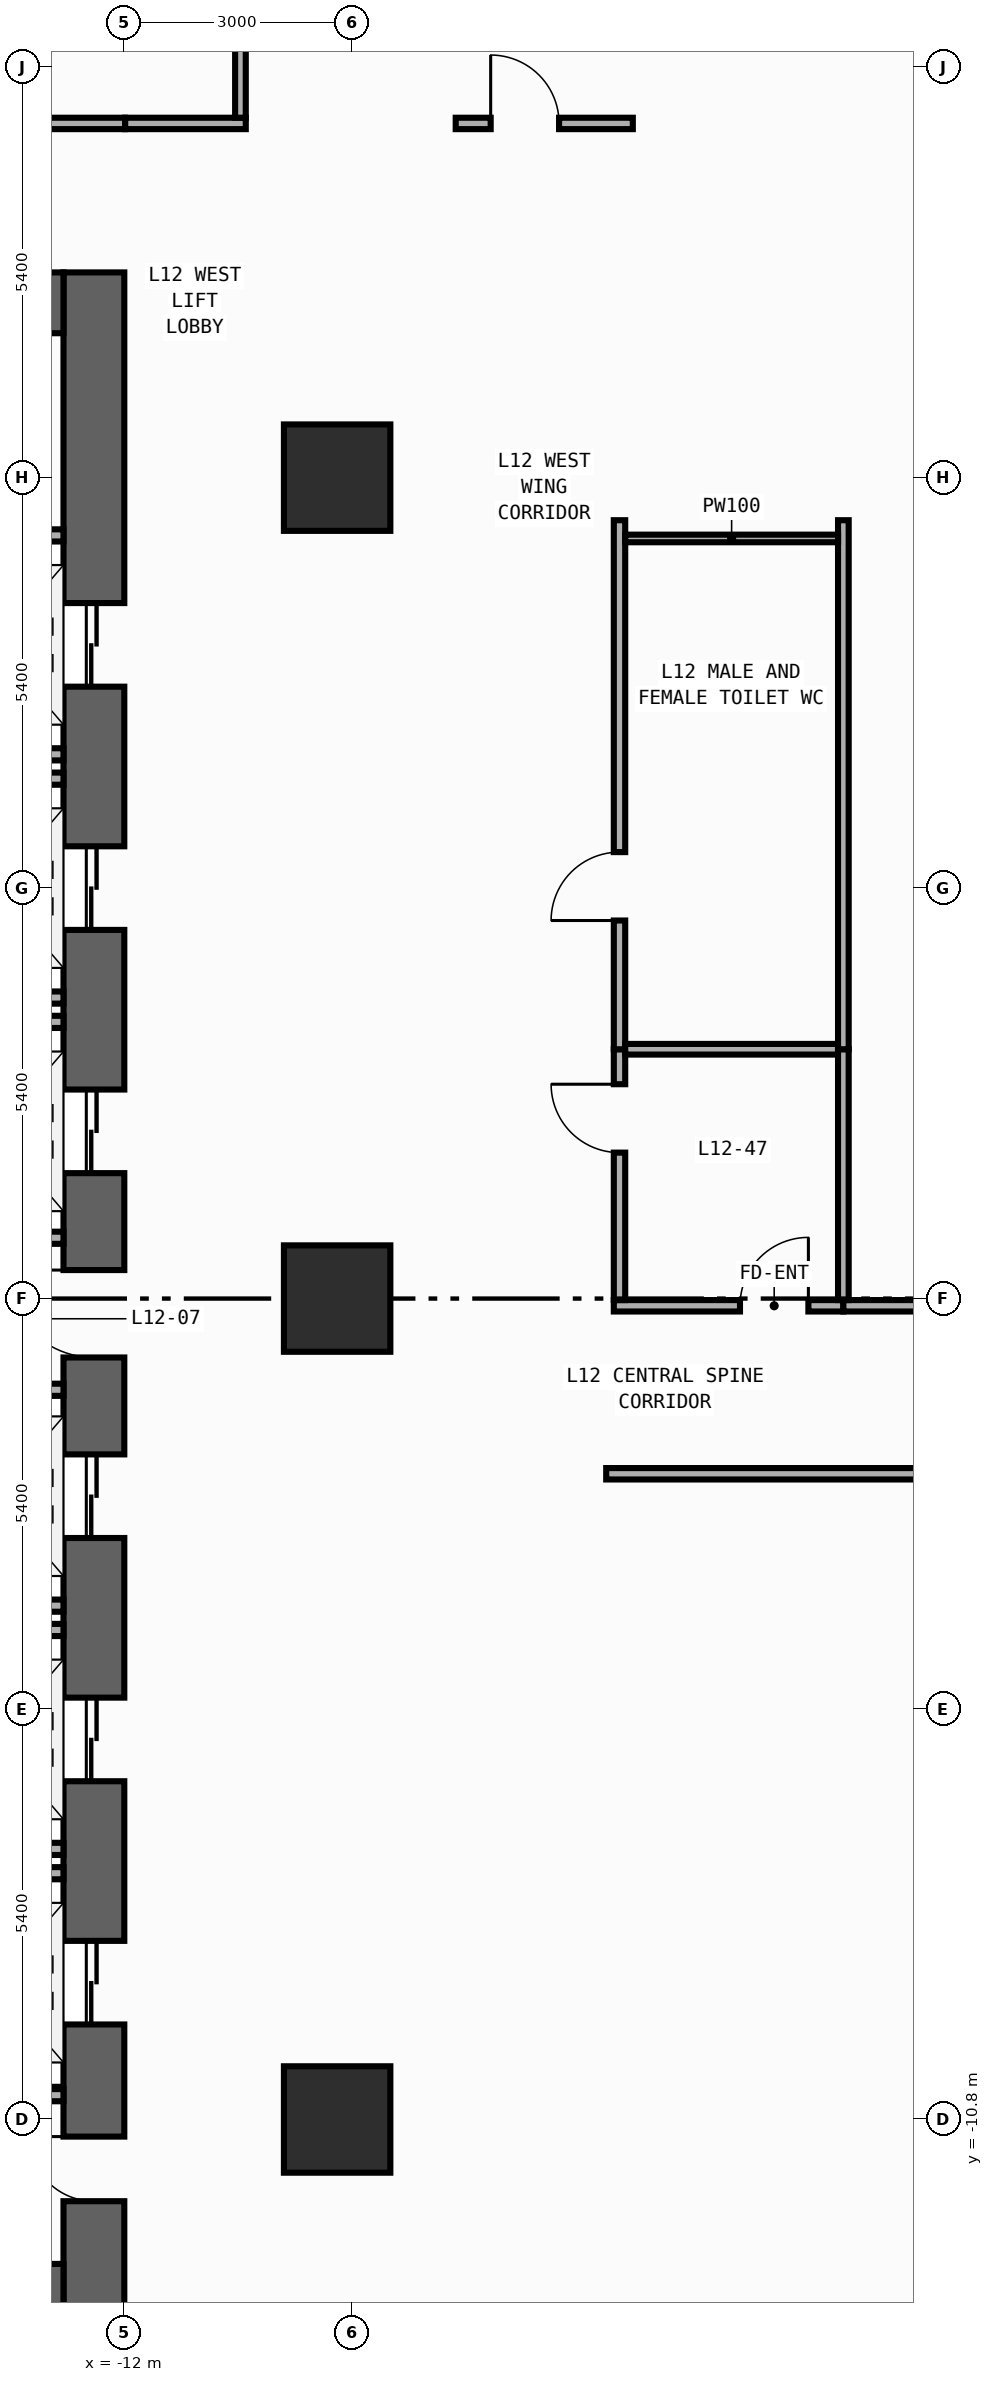
"""IFC4 building model, lengths in metres.
Left out: names, types, materials, properties, quantities, classifications, styles, units other than length and angle.
Written with IfcOpenShell. Run it as: python <this file> out.ifc"""

import sys

from ifc_helpers import new_model, si_unit, direction, frame, frame_2d, origin, origin_2d, place, context, subcontext, project, spatial, rectangle, extrude, element, fill, save


model = new_model("IFC4")
c1 = context("Model", 3, precision=1e-05, world=origin(), true_north=direction((0.0, 1.0)))
c2 = subcontext(c1, "Body", "Model", "MODEL_VIEW")
j1 = project(units=[si_unit("LENGTHUNIT", "METRE"), si_unit("PLANEANGLEUNIT", "RADIAN")], contexts=[c1])
p1 = place(None, origin())
s1 = spatial("IfcSite", under=j1, at=p1, CompositionType="ELEMENT")
p2 = place(p1, origin())
s2 = spatial("IfcBuilding", under=s1, at=p2, CompositionType="ELEMENT")
p3 = place(p2, frame((0.0, 0.0, 51.2)))
s3 = spatial("IfcBuildingStorey", under=s2, at=p3, CompositionType="ELEMENT", Elevation=51.2)
p4 = place(p3, frame((-12.4, -13.5, 0.0), z_axis=(0.0, 0.0, 1.0), x_axis=(0.0, 1.0, 0.0)))
e1 = element("IfcWall", 1, at=p4, inside=s3, PredefinedType="SHEAR", context=c2, shape_type="SweptSolid", body=[
    extrude(rectangle(XDim=27.0, YDim=0.8, at=frame_2d((13.5, 0.0))), origin(), (0.0, 0.0, 1.0), 3.94),
])
p5 = place(p4, frame((21.55, 0.0, 0.0)))
e2 = element("IfcOpeningElement", 2, at=p5, cuts=e1, PredefinedType="OPENING", context=c2, shape_type="SweptSolid", body=[
    extrude(rectangle(XDim=1.1, YDim=2.2, at=frame_2d((0.55, 1.1))), frame((0.0, 0.41, 0.0), z_axis=(0.0, -1.0, 0.0), x_axis=(1.0, 0.0, 0.0)), (0.0, 0.0, 1.0), 0.82),
])
p6 = place(p4, frame((18.35, 0.0, 0.0)))
e3 = element("IfcOpeningElement", 3, at=p6, cuts=e1, PredefinedType="OPENING", context=c2, shape_type="SweptSolid", body=[
    extrude(rectangle(XDim=1.1, YDim=2.2, at=frame_2d((0.55, 1.1))), frame((0.0, 0.41, 0.0), z_axis=(0.0, -1.0, 0.0), x_axis=(1.0, 0.0, 0.0)), (0.0, 0.0, 1.0), 0.82),
])
p7 = place(p4, frame((15.15, 0.0, 0.0)))
e4 = element("IfcOpeningElement", 4, at=p7, cuts=e1, PredefinedType="OPENING", context=c2, shape_type="SweptSolid", body=[
    extrude(rectangle(XDim=1.1, YDim=2.2, at=frame_2d((0.55, 1.1))), frame((0.0, 0.41, 0.0), z_axis=(0.0, -1.0, 0.0), x_axis=(1.0, 0.0, 0.0)), (0.0, 0.0, 1.0), 0.82),
])
p8 = place(p4, frame((10.35, 0.0, 0.0)))
e5 = element("IfcOpeningElement", 5, at=p8, cuts=e1, PredefinedType="OPENING", context=c2, shape_type="SweptSolid", body=[
    extrude(rectangle(XDim=1.1, YDim=2.2, at=frame_2d((0.55, 1.1))), frame((0.0, 0.41, 0.0), z_axis=(0.0, -1.0, 0.0), x_axis=(1.0, 0.0, 0.0)), (0.0, 0.0, 1.0), 0.82),
])
p9 = place(p4, frame((7.15, 0.0, 0.0)))
e6 = element("IfcOpeningElement", 6, at=p9, cuts=e1, PredefinedType="OPENING", context=c2, shape_type="SweptSolid", body=[
    extrude(rectangle(XDim=1.1, YDim=2.2, at=frame_2d((0.55, 1.1))), frame((0.0, 0.41, 0.0), z_axis=(0.0, -1.0, 0.0), x_axis=(1.0, 0.0, 0.0)), (0.0, 0.0, 1.0), 0.82),
])
p10 = place(p4, frame((3.95, 0.0, 0.0)))
e7 = element("IfcOpeningElement", 7, at=p10, cuts=e1, PredefinedType="OPENING", context=c2, shape_type="SweptSolid", body=[
    extrude(rectangle(XDim=1.1, YDim=2.2, at=frame_2d((0.55, 1.1))), frame((0.0, 0.41, 0.0), z_axis=(0.0, -1.0, 0.0), x_axis=(1.0, 0.0, 0.0)), (0.0, 0.0, 1.0), 0.82),
])
p11 = place(p4, frame((12.725, 0.0, 0.0)))
e8 = element("IfcOpeningElement", 8, at=p11, cuts=e1, PredefinedType="OPENING", context=c2, shape_type="SweptSolid", body=[
    extrude(rectangle(XDim=1.15, YDim=2.2, at=frame_2d((0.575, 1.1))), frame((0.0, 0.41, 0.0), z_axis=(0.0, -1.0, 0.0), x_axis=(1.0, 0.0, 0.0)), (0.0, 0.0, 1.0), 0.82),
])
p12 = place(p4, frame((1.625, 0.0, 0.0)))
e9 = element("IfcOpeningElement", 9, at=p12, cuts=e1, PredefinedType="OPENING", context=c2, shape_type="SweptSolid", body=[
    extrude(rectangle(XDim=0.85, YDim=2.1, at=frame_2d((0.425, 1.05))), frame((0.0, 0.41, 0.0), z_axis=(0.0, -1.0, 0.0), x_axis=(1.0, 0.0, 0.0)), (0.0, 0.0, 1.0), 0.82),
])
for number, where, z_axis, x_axis in (
    (10, (-19.6, -13.1, 0.0), (0.0, 0.0, 1.0), (1.0, 0.0, 0.0)),
    (11, (-19.6, 13.1, 0.0), (0.0, 0.0, 1.0), (1.0, 0.0, 0.0)),
):
    element("IfcWall", number, at=place(p3, frame(where, z_axis=z_axis, x_axis=x_axis)), inside=s3, PredefinedType="SHEAR", context=c2, shape_type="SweptSolid", body=[
        extrude(rectangle(XDim=6.8, YDim=0.8, at=frame_2d((3.4, 0.0))), origin(), (0.0, 0.0, 1.0), 3.94),
    ])
for number, where, z_axis, x_axis in (
    (12, (-9.2, -10.8, 0.0), (0.0, 0.0, 1.0), (1.0, 0.0, 0.0)),
    (13, (-9.2, 0.0, 0.0), (0.0, 0.0, 1.0), (1.0, 0.0, 0.0)),
    (14, (-9.2, 10.8, 0.0), (0.0, 0.0, 1.0), (1.0, 0.0, 0.0)),
):
    element("IfcColumn", number, at=place(p3, frame(where, z_axis=z_axis, x_axis=x_axis)), inside=s3, PredefinedType="COLUMN", context=c2, shape_type="SweptSolid", body=[
        extrude(rectangle(XDim=1.4, YDim=1.4, at=origin_2d()), origin(), (0.0, 0.0, 1.0), 4.2),
    ])
for number, where, z_axis, x_axis in (
    (15, (-14.99, 7.16, 0.0), (0.0, 0.0, 1.0), (1.0, 0.0, 0.0)),
    (16, (-14.99, 10.04, 0.0), (0.0, 0.0, 1.0), (1.0, 0.0, 0.0)),
    (17, (-14.99, 3.96, 0.0), (0.0, 0.0, 1.0), (1.0, 0.0, 0.0)),
    (18, (-14.99, 6.84, 0.0), (0.0, 0.0, 1.0), (1.0, 0.0, 0.0)),
    (19, (-14.99, 3.64, 0.0), (0.0, 0.0, 1.0), (1.0, 0.0, 0.0)),
    (20, (-14.99, -4.04, 0.0), (0.0, 0.0, 1.0), (1.0, 0.0, 0.0)),
    (21, (-14.99, -7.24, 0.0), (0.0, 0.0, 1.0), (1.0, 0.0, 0.0)),
    (22, (-14.99, -4.36, 0.0), (0.0, 0.0, 1.0), (1.0, 0.0, 0.0)),
    (23, (-14.99, -7.56, 0.0), (0.0, 0.0, 1.0), (1.0, 0.0, 0.0)),
):
    element("IfcWall", number, at=place(p3, frame(where, z_axis=z_axis, x_axis=x_axis)), inside=s3, PredefinedType="STANDARD", context=c2, shape_type="SweptSolid", body=[
        extrude(rectangle(XDim=2.19, YDim=0.16, at=frame_2d((1.095, 0.0))), origin(), (0.0, 0.0, 1.0), 3.94),
    ])
for number, where, z_axis, x_axis in (
    (24, (-15.4, 0.8, 0.0), (0.0, 0.0, 1.0), (1.0, 0.0, 0.0)),
    (25, (-15.4, -1.2, 0.0), (0.0, 0.0, 1.0), (1.0, 0.0, 0.0)),
    (26, (-15.4, -10.48, 0.0), (0.0, 0.0, 1.0), (1.0, 0.0, 0.0)),
):
    element("IfcWall", number, at=place(p3, frame(where, z_axis=z_axis, x_axis=x_axis)), inside=s3, PredefinedType="STANDARD", context=c2, shape_type="SweptSolid", body=[
        extrude(rectangle(XDim=2.6, YDim=0.16, at=frame_2d((1.3, 0.0))), origin(), (0.0, 0.0, 1.0), 3.94),
    ])
p13 = place(p3, frame((-11.99, 15.46, 0.0), z_axis=(0.0, 0.0, 1.0), x_axis=(1.0, 0.0, 0.0)))
e27 = element("IfcWall", 27, at=p13, inside=s3, PredefinedType="PARTITIONING", context=c2, shape_type="SweptSolid", body=[
    extrude(rectangle(XDim=1.588, YDim=0.15, at=frame_2d((0.794, 0.0))), origin(), (0.0, 0.0, 1.0), 3.94),
])
p14 = place(p3, frame((-5.56, -0.095, 0.0), z_axis=(0.0, 0.0, 1.0), x_axis=(1.0, 0.0, 0.0)))
e28 = element("IfcWall", 28, at=p14, inside=s3, PredefinedType="PARTITIONING", context=c2, shape_type="SweptSolid", body=[
    extrude(rectangle(XDim=3.02, YDim=0.15, at=frame_2d((1.51, 0.0))), origin(), (0.0, 0.0, 1.0), 3.14),
])
p15 = place(p14, frame((1.66, 0.0, 0.0)))
e29 = element("IfcOpeningElement", 29, at=p15, cuts=e28, PredefinedType="OPENING", context=c2, shape_type="SweptSolid", body=[
    extrude(rectangle(XDim=0.9, YDim=2.15, at=frame_2d((0.45, 1.075))), frame((0.0, 0.085, 0.0), z_axis=(0.0, -1.0, 0.0), x_axis=(1.0, 0.0, 0.0)), (0.0, 0.0, 1.0), 0.17),
])
p16 = place(p3, frame((-2.54, -0.095, 0.0), z_axis=(0.0, 0.0, 1.0), x_axis=(1.0, 0.0, 0.0)))
e30 = element("IfcWall", 30, at=p16, inside=s3, PredefinedType="PARTITIONING", context=c2, shape_type="SweptSolid", body=[
    extrude(rectangle(XDim=9.3, YDim=0.15, at=frame_2d((4.65, 0.0))), origin(), (0.0, 0.0, 1.0), 3.14),
])
p17 = place(p16, frame((2.077, 0.0, 0.0)))
e31 = element("IfcOpeningElement", 31, at=p17, cuts=e30, PredefinedType="OPENING", context=c2, shape_type="SweptSolid", body=[
    extrude(rectangle(XDim=0.9, YDim=2.15, at=frame_2d((0.45, 1.075))), frame((0.0, 0.085, 0.0), z_axis=(0.0, -1.0, 0.0), x_axis=(1.0, 0.0, 0.0)), (0.0, 0.0, 1.0), 0.17),
])
p18 = place(p3, frame((-5.66, -2.305, 0.0), z_axis=(0.0, 0.0, 1.0), x_axis=(1.0, 0.0, 0.0)))
e32 = element("IfcWall", 32, at=p18, inside=s3, PredefinedType="PARTITIONING", context=c2, shape_type="SweptSolid", body=[
    extrude(rectangle(XDim=12.52, YDim=0.15, at=frame_2d((6.26, 0.0))), origin(), (0.0, 0.0, 1.0), 3.94),
])
p19 = place(p18, frame((5.305, 0.0, 0.0)))
e33 = element("IfcOpeningElement", 33, at=p19, cuts=e32, PredefinedType="OPENING", context=c2, shape_type="SweptSolid", body=[
    extrude(rectangle(XDim=0.9, YDim=2.15, at=frame_2d((0.45, 1.075))), frame((0.0, 0.085, 0.0), z_axis=(0.0, -1.0, 0.0), x_axis=(1.0, 0.0, 0.0)), (0.0, 0.0, 1.0), 0.17),
])
p20 = place(p3, frame((-7.64, 15.46, 0.0), z_axis=(0.0, 0.0, 1.0), x_axis=(1.0, 0.0, 0.0)))
e34 = element("IfcWall", 34, at=p20, inside=s3, PredefinedType="PARTITIONING", context=c2, shape_type="SweptSolid", body=[
    extrude(rectangle(XDim=2.33, YDim=0.15, at=frame_2d((1.165, 0.0))), origin(), (0.0, 0.0, 1.0), 3.94),
])
p21 = place(p20, frame((0.46, 0.0, 0.0)))
e35 = element("IfcOpeningElement", 35, at=p21, cuts=e34, PredefinedType="OPENING", context=c2, shape_type="SweptSolid", body=[
    extrude(rectangle(XDim=0.9, YDim=2.15, at=frame_2d((0.45, 1.075))), frame((0.0, 0.085, 0.0), z_axis=(0.0, -1.0, 0.0), x_axis=(1.0, 0.0, 0.0)), (0.0, 0.0, 1.0), 0.17),
])
p22 = place(p3, frame((-5.485, -0.02, 0.0), z_axis=(0.0, 0.0, 1.0), x_axis=(0.0, 1.0, 0.0)))
e36 = element("IfcWall", 36, at=p22, inside=s3, PredefinedType="PARTITIONING", context=c2, shape_type="SweptSolid", body=[
    extrude(rectangle(XDim=3.3, YDim=0.15, at=frame_2d((1.65, 0.0))), origin(), (0.0, 0.0, 1.0), 3.94),
])
p23 = place(p22, frame((1.94, 0.0, 0.0)))
e37 = element("IfcOpeningElement", 37, at=p23, cuts=e36, PredefinedType="OPENING", context=c2, shape_type="SweptSolid", body=[
    extrude(rectangle(XDim=0.9, YDim=2.15, at=frame_2d((0.45, 1.075))), frame((0.0, 0.085, 0.0), z_axis=(0.0, -1.0, 0.0), x_axis=(1.0, 0.0, 0.0)), (0.0, 0.0, 1.0), 0.17),
])
p24 = place(p3, frame((-5.485, 3.28, 0.0), z_axis=(0.0, 0.0, 1.0), x_axis=(0.0, 1.0, 0.0)))
e38 = element("IfcWall", 38, at=p24, inside=s3, PredefinedType="PARTITIONING", context=c2, shape_type="SweptSolid", body=[
    extrude(rectangle(XDim=6.96, YDim=0.15, at=frame_2d((3.48, 0.0))), origin(), (0.0, 0.0, 1.0), 3.94),
])
p25 = place(p24, frame((1.694, 0.0, 0.0)))
e39 = element("IfcOpeningElement", 39, at=p25, cuts=e38, PredefinedType="OPENING", context=c2, shape_type="SweptSolid", body=[
    extrude(rectangle(XDim=0.9, YDim=2.15, at=frame_2d((0.45, 1.075))), frame((0.0, 0.085, 0.0), z_axis=(0.0, -1.0, 0.0), x_axis=(1.0, 0.0, 0.0)), (0.0, 0.0, 1.0), 0.17),
])
p26 = place(p3, frame((-20.64, 15.46, 0.0), z_axis=(0.0, 0.0, 1.0), x_axis=(1.0, 0.0, 0.0)))
e40 = element("IfcWall", 40, at=p26, inside=s3, PredefinedType="PARTITIONING", context=c2, shape_type="SweptSolid", body=[
    extrude(rectangle(XDim=8.65, YDim=0.15, at=frame_2d((4.325, 0.0))), origin(), (0.0, 0.0, 1.0), 3.94),
])
p27 = place(p26, frame((2.871, 0.0, 0.0)))
e41 = element("IfcOpeningElement", 41, at=p27, cuts=e40, PredefinedType="OPENING", context=c2, shape_type="SweptSolid", body=[
    extrude(rectangle(XDim=0.9, YDim=2.15, at=frame_2d((0.45, 1.075))), frame((0.0, 0.085, 0.0), z_axis=(0.0, -1.0, 0.0), x_axis=(1.0, 0.0, 0.0)), (0.0, 0.0, 1.0), 0.17),
])
p28 = place(p3, frame((-10.472, 15.535, 0.0), z_axis=(0.0, 0.0, 1.0), x_axis=(0.0, 1.0, 0.0)))
e42 = element("IfcWall", 42, at=p28, inside=s3, PredefinedType="PARTITIONING", context=c2, shape_type="SweptSolid", body=[
    extrude(rectangle(XDim=11.32, YDim=0.14, at=frame_2d((5.66, 0.0))), origin(), (0.0, 0.0, 1.0), 3.94),
])
p29 = place(p3, frame((-5.41, 3.28, 0.0), z_axis=(0.0, 0.0, 1.0), x_axis=(1.0, 0.0, 0.0)))
e43 = element("IfcWall", 43, at=p29, inside=s3, PredefinedType="PARTITIONING", context=c2, shape_type="SweptSolid", body=[
    extrude(rectangle(XDim=2.8, YDim=0.14, at=frame_2d((1.4, 0.0))), origin(), (0.0, 0.0, 1.0), 3.94),
])
p30 = place(p3, frame((-2.54, -0.02, 0.0), z_axis=(0.0, 0.0, 1.0), x_axis=(0.0, 1.0, 0.0)))
e44 = element("IfcWall", 44, at=p30, inside=s3, PredefinedType="PARTITIONING", context=c2, shape_type="SweptSolid", body=[
    extrude(rectangle(XDim=3.3, YDim=0.14, at=frame_2d((1.65, 0.0))), origin(), (0.0, 0.0, 1.0), 3.94),
])
p31 = place(p3, frame((-2.54, 3.28, 0.0), z_axis=(0.0, 0.0, 1.0), x_axis=(0.0, 1.0, 0.0)))
e45 = element("IfcWall", 45, at=p31, inside=s3, PredefinedType="PARTITIONING", context=c2, shape_type="SweptSolid", body=[
    extrude(rectangle(XDim=6.96, YDim=0.14, at=frame_2d((3.48, 0.0))), origin(), (0.0, 0.0, 1.0), 3.94),
])
p32 = place(p3, frame((-5.41, 10.0, 0.0), z_axis=(0.0, 0.0, 1.0), x_axis=(1.0, 0.0, 0.0)))
e46 = element("IfcWall", 46, at=p32, inside=s3, PredefinedType="PARTITIONING", context=c2, shape_type="SweptSolid", body=[
    extrude(rectangle(XDim=2.8, YDim=0.1, at=frame_2d((1.4, 0.0))), origin(), (0.0, 0.0, 1.0), 3.94),
])
p33 = place(p5, origin())
e47 = element("IfcDoor", 47, at=p33, inside=s3, OperationType="DOUBLE_DOOR_SLIDING", PredefinedType="DOOR", context=c2, shape_type="SweptSolid", body=[
    extrude(rectangle(XDim=1.1, YDim=2.2, at=frame_2d((0.55, 1.1))), frame((0.0, 0.025, 0.0), z_axis=(0.0, -1.0, 0.0), x_axis=(1.0, 0.0, 0.0)), (0.0, 0.0, 1.0), 0.05),
])
fill(e2, e47)
p34 = place(p6, origin())
e48 = element("IfcDoor", 48, at=p34, inside=s3, OperationType="DOUBLE_DOOR_SLIDING", PredefinedType="DOOR", context=c2, shape_type="SweptSolid", body=[
    extrude(rectangle(XDim=1.1, YDim=2.2, at=frame_2d((0.55, 1.1))), frame((0.0, 0.025, 0.0), z_axis=(0.0, -1.0, 0.0), x_axis=(1.0, 0.0, 0.0)), (0.0, 0.0, 1.0), 0.05),
])
fill(e3, e48)
p35 = place(p7, origin())
e49 = element("IfcDoor", 49, at=p35, inside=s3, OperationType="DOUBLE_DOOR_SLIDING", PredefinedType="DOOR", context=c2, shape_type="SweptSolid", body=[
    extrude(rectangle(XDim=1.1, YDim=2.2, at=frame_2d((0.55, 1.1))), frame((0.0, 0.025, 0.0), z_axis=(0.0, -1.0, 0.0), x_axis=(1.0, 0.0, 0.0)), (0.0, 0.0, 1.0), 0.05),
])
fill(e4, e49)
p36 = place(p8, origin())
e50 = element("IfcDoor", 50, at=p36, inside=s3, OperationType="DOUBLE_DOOR_SLIDING", PredefinedType="DOOR", context=c2, shape_type="SweptSolid", body=[
    extrude(rectangle(XDim=1.1, YDim=2.2, at=frame_2d((0.55, 1.1))), frame((0.0, 0.025, 0.0), z_axis=(0.0, -1.0, 0.0), x_axis=(1.0, 0.0, 0.0)), (0.0, 0.0, 1.0), 0.05),
])
fill(e5, e50)
p37 = place(p9, origin())
e51 = element("IfcDoor", 51, at=p37, inside=s3, OperationType="DOUBLE_DOOR_SLIDING", PredefinedType="DOOR", context=c2, shape_type="SweptSolid", body=[
    extrude(rectangle(XDim=1.1, YDim=2.2, at=frame_2d((0.55, 1.1))), frame((0.0, 0.025, 0.0), z_axis=(0.0, -1.0, 0.0), x_axis=(1.0, 0.0, 0.0)), (0.0, 0.0, 1.0), 0.05),
])
fill(e6, e51)
p38 = place(p10, origin())
e52 = element("IfcDoor", 52, at=p38, inside=s3, OperationType="DOUBLE_DOOR_SLIDING", PredefinedType="DOOR", context=c2, shape_type="SweptSolid", body=[
    extrude(rectangle(XDim=1.1, YDim=2.2, at=frame_2d((0.55, 1.1))), frame((0.0, 0.025, 0.0), z_axis=(0.0, -1.0, 0.0), x_axis=(1.0, 0.0, 0.0)), (0.0, 0.0, 1.0), 0.05),
])
fill(e7, e52)
p39 = place(p11, origin())
e53 = element("IfcDoor", 53, at=p39, inside=s3, OperationType="SINGLE_SWING_RIGHT", PredefinedType="DOOR", context=c2, shape_type="SweptSolid", body=[
    extrude(rectangle(XDim=1.15, YDim=2.2, at=frame_2d((0.575, 1.1))), frame((0.0, 0.025, 0.0), z_axis=(0.0, -1.0, 0.0), x_axis=(1.0, 0.0, 0.0)), (0.0, 0.0, 1.0), 0.05),
])
fill(e8, e53)
p40 = place(p12, origin())
e54 = element("IfcDoor", 54, at=p40, inside=s3, OperationType="SINGLE_SWING_RIGHT", PredefinedType="DOOR", context=c2, shape_type="SweptSolid", body=[
    extrude(rectangle(XDim=0.85, YDim=2.1, at=frame_2d((0.425, 1.05))), frame((0.0, 0.025, 0.0), z_axis=(0.0, -1.0, 0.0), x_axis=(1.0, 0.0, 0.0)), (0.0, 0.0, 1.0), 0.05),
])
fill(e9, e54)
p41 = place(p15, origin())
e55 = element("IfcDoor", 55, at=p41, inside=s3, OperationType="SINGLE_SWING_RIGHT", PredefinedType="DOOR", context=c2, shape_type="SweptSolid", body=[
    extrude(rectangle(XDim=0.9, YDim=2.15, at=frame_2d((0.45, 1.075))), frame((0.0, 0.025, 0.0), z_axis=(0.0, -1.0, 0.0), x_axis=(1.0, 0.0, 0.0)), (0.0, 0.0, 1.0), 0.05),
])
fill(e29, e55)
p42 = place(p21, origin())
e56 = element("IfcDoor", 56, at=p42, inside=s3, OperationType="SINGLE_SWING_LEFT", PredefinedType="DOOR", context=c2, shape_type="SweptSolid", body=[
    extrude(rectangle(XDim=0.9, YDim=2.15, at=frame_2d((0.45, 1.075))), frame((0.0, 0.025, 0.0), z_axis=(0.0, -1.0, 0.0), x_axis=(1.0, 0.0, 0.0)), (0.0, 0.0, 1.0), 0.05),
])
fill(e35, e56)
p43 = place(p23, origin())
e57 = element("IfcDoor", 57, at=p43, inside=s3, OperationType="SINGLE_SWING_RIGHT", PredefinedType="DOOR", context=c2, shape_type="SweptSolid", body=[
    extrude(rectangle(XDim=0.9, YDim=2.15, at=frame_2d((0.45, 1.075))), frame((0.0, 0.025, 0.0), z_axis=(0.0, -1.0, 0.0), x_axis=(1.0, 0.0, 0.0)), (0.0, 0.0, 1.0), 0.05),
])
fill(e37, e57)
p44 = place(p25, origin())
e58 = element("IfcDoor", 58, at=p44, inside=s3, OperationType="SINGLE_SWING_LEFT", PredefinedType="DOOR", context=c2, shape_type="SweptSolid", body=[
    extrude(rectangle(XDim=0.9, YDim=2.15, at=frame_2d((0.45, 1.075))), frame((0.0, 0.025, 0.0), z_axis=(0.0, -1.0, 0.0), x_axis=(1.0, 0.0, 0.0)), (0.0, 0.0, 1.0), 0.05),
])
fill(e39, e58)
save(model, sys.argv[1])
